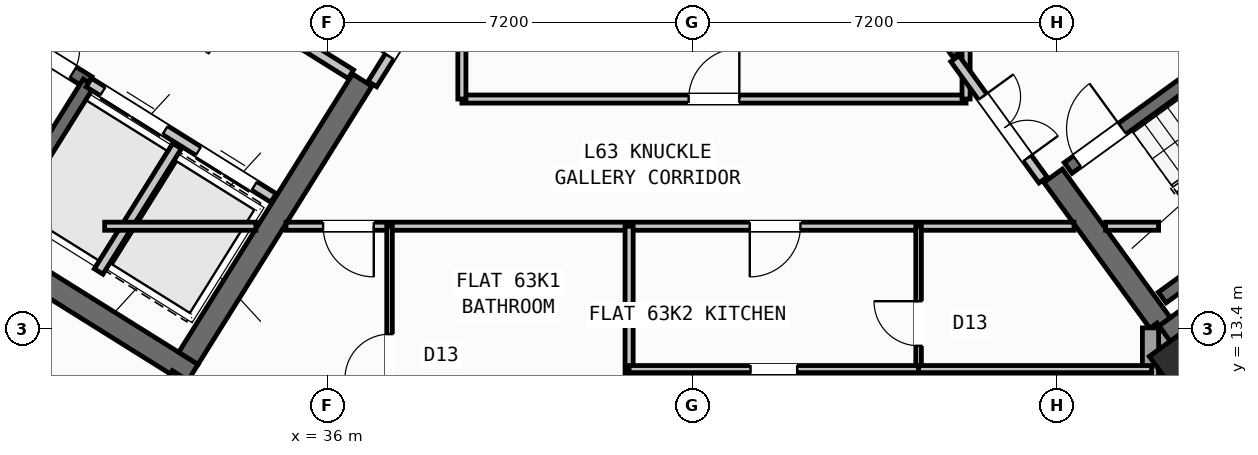
"""IFC4 building model, lengths in metres.
Left out: names, types, materials, properties, quantities, classifications, styles, units other than length and angle.
Written with IfcOpenShell. Run it as: python <this file> out.ifc"""

import sys

from ifc_helpers import new_model, si_unit, direction, frame, frame_2d, origin, origin_2d, place, context, subcontext, project, spatial, rectangle, hollow_rectangle, extrude, source, transform, mapped, element, fill, save


model = new_model("IFC4")
c1 = context("Model", 3, precision=1e-05, world=origin(), true_north=direction((0.0, 1.0)))
c2 = subcontext(c1, "Body", "Model", "MODEL_VIEW")
j1 = project(units=[si_unit("LENGTHUNIT", "METRE"), si_unit("PLANEANGLEUNIT", "RADIAN")], contexts=[c1])
p1 = place(None, origin())
s1 = spatial("IfcSite", under=j1, at=p1, CompositionType="ELEMENT")
p2 = place(p1, origin())
s2 = spatial("IfcBuilding", under=s1, at=p2, CompositionType="ELEMENT")
p3 = place(p2, frame((0.0, 0.0, 251.1)))
s3 = spatial("IfcBuildingStorey", under=s2, at=p3, CompositionType="ELEMENT", Elevation=251.1)
p4 = place(p3, frame((33.324, 12.503, 0.0), z_axis=(0.0, 0.0, 1.0), x_axis=(-0.848043529849, 0.529926571782, 0.0)))
e1 = element("IfcWall", 1, at=p4, inside=s3, PredefinedType="SHEAR", context=c2, shape_type="SweptSolid", body=[
    extrude(rectangle(XDim=13.04, YDim=0.45, at=frame_2d((6.52, 0.0))), origin(), (0.0, 0.0, 1.0), 3.32),
])
p5 = place(p3, frame((36.683, 18.304, 0.0), z_axis=(0.0, 0.0, 1.0), x_axis=(-0.529904039071, -0.848057609704, 0.0)))
e2 = element("IfcWall", 2, at=p5, inside=s3, PredefinedType="SHEAR", context=c2, shape_type="SweptSolid", body=[
    extrude(rectangle(XDim=6.475, YDim=0.45, at=frame_2d((3.238, 0.0))), origin(), (0.0, 0.0, 1.0), 3.32),
])
p6 = place(p3, frame((52.399, 13.169, 0.0), z_axis=(0.0, 0.0, 1.0), x_axis=(0.809022352778, 0.587777877013, 0.0)))
e3 = element("IfcWall", 3, at=p6, inside=s3, PredefinedType="SHEAR", context=c2, shape_type="SweptSolid", body=[
    extrude(rectangle(XDim=12.24, YDim=0.45, at=frame_2d((6.12, 0.0))), origin(), (0.0, 0.0, 1.0), 3.32),
])
p7 = place(p3, frame((52.449, 13.483, 0.0), z_axis=(0.0, 0.0, 1.0), x_axis=(-0.587819244441, 0.808992296542, 0.0)))
e4 = element("IfcWall", 4, at=p7, inside=s3, PredefinedType="SHEAR", context=c2, shape_type="SweptSolid", body=[
    extrude(rectangle(XDim=3.625, YDim=0.45, at=frame_2d((1.812, 0.0))), origin(), (0.0, 0.0, 1.0), 3.32),
])
p8 = place(p3, frame((48.526, 18.884, 0.0), z_axis=(0.0, 0.0, 1.0), x_axis=(-0.587774812919, 0.809024578921, 0.0)))
e5 = element("IfcWall", 5, at=p8, inside=s3, PredefinedType="SHEAR", context=c2, shape_type="SweptSolid", body=[
    extrude(rectangle(XDim=6.475, YDim=0.45, at=frame_2d((3.238, 0.0))), origin(), (0.0, 0.0, 1.0), 3.32),
])
m1 = source(origin(), c2, "Body", "SweptSolid", [
    extrude(hollow_rectangle(XDim=0.7, YDim=0.7, WallThickness=0.028, at=origin_2d()), origin(), (0.0, 0.0, 1.0), 3.6),
])
for number, where, z_axis, x_axis in (
    (6, (33.046, 12.087, 0.0), (0.0, 0.0, 1.0), (-0.848, 0.53, 0.0)),
    (7, (52.705, 12.773, 0.0), (0.0, 0.0, 1.0), (0.809, 0.588, 0.0)),
):
    element("IfcColumn", number, at=place(p3, frame(where, z_axis=z_axis, x_axis=x_axis)), inside=s3, PredefinedType="COLUMN", context=c2, shape_type="MappedRepresentation", body=[
        mapped(m1, transform((0.0, 0.0, 0.0), scale=1.0)),
    ])
p9 = place(p3, frame((56.581, 7.439, 0.0), z_axis=(0.0, 0.0, 1.0), x_axis=(-0.587776558368, 0.809023310809, 0.0)))
e8 = element("IfcWall", 8, at=p9, inside=s3, PredefinedType="STANDARD", context=c2, shape_type="SweptSolid", body=[
    extrude(rectangle(XDim=7.385, YDim=0.32, at=frame_2d((3.693, 0.0))), origin(), (0.0, 0.0, 1.0), 2.845),
])
p10 = place(p3, frame((52.24, 13.414, 0.0), z_axis=(0.0, 0.0, 1.0), x_axis=(0.0, -1.0, 0.0)))
e9 = element("IfcWall", 9, at=p10, inside=s3, PredefinedType="STANDARD", context=c2, shape_type="SweptSolid", body=[
    extrude(rectangle(XDim=9.948, YDim=0.32, at=frame_2d((4.974, 0.0))), origin(), (0.0, 0.0, 1.0), 3.32),
])
p11 = place(p10, frame((3.295, 0.0, 0.9)))
e10 = element("IfcOpeningElement", 10, at=p11, cuts=e9, PredefinedType="OPENING", context=c2, shape_type="SweptSolid", body=[
    extrude(rectangle(XDim=1.65, YDim=1.45, at=frame_2d((0.825, 0.725))), frame((0.0, 0.17, 0.0), z_axis=(0.0, -1.0, 0.0), x_axis=(1.0, 0.0, 0.0)), (0.0, 0.0, 1.0), 0.34),
])
p12 = place(p10, frame((7.408, 0.0, 0.9)))
e11 = element("IfcOpeningElement", 11, at=p12, cuts=e9, PredefinedType="OPENING", context=c2, shape_type="SweptSolid", body=[
    extrude(rectangle(XDim=1.35, YDim=1.45, at=frame_2d((0.675, 0.725))), frame((0.0, 0.17, 0.0), z_axis=(0.0, -1.0, 0.0), x_axis=(1.0, 0.0, 0.0)), (0.0, 0.0, 1.0), 0.34),
])
p13 = place(p3, frame((31.28, 18.261, 0.0), z_axis=(0.0, 0.0, 1.0), x_axis=(-0.848051618787, 0.529913626805, 0.0)))
e12 = element("IfcWall", 12, at=p13, inside=s3, PredefinedType="SHEAR", context=c2, shape_type="SweptSolid", body=[
    extrude(rectangle(XDim=7.46, YDim=0.26, at=frame_2d((3.73, 0.0))), origin(), (0.0, 0.0, 1.0), 3.32),
])
p14 = place(p13, frame((0.36, 0.0, 0.0)))
e13 = element("IfcOpeningElement", 13, at=p14, cuts=e12, PredefinedType="OPENING", context=c2, shape_type="SweptSolid", body=[
    extrude(rectangle(XDim=0.86, YDim=2.05, at=frame_2d((0.43, 1.025))), frame((0.0, 0.14, 0.0), z_axis=(0.0, -1.0, 0.0), x_axis=(1.0, 0.0, 0.0)), (0.0, 0.0, 1.0), 0.28),
])
p15 = place(p3, frame((31.288, 18.256, 0.0), z_axis=(0.0, 0.0, 1.0), x_axis=(-0.529943379326, -0.848033026897, 0.0)))
e14 = element("IfcWall", 14, at=p15, inside=s3, PredefinedType="SHEAR", context=c2, shape_type="SweptSolid", body=[
    extrude(rectangle(XDim=3.16, YDim=0.26, at=frame_2d((1.58, 0.0))), origin(), (0.0, 0.0, 1.0), 3.32),
])
p16 = place(p3, frame((34.933, 15.978, 0.0), z_axis=(0.0, 0.0, 1.0), x_axis=(-0.848055739377, 0.529907032327, 0.0)))
e15 = element("IfcWall", 15, at=p16, inside=s3, PredefinedType="STANDARD", context=c2, shape_type="SweptSolid", body=[
    extrude(rectangle(XDim=4.298, YDim=0.2, at=frame_2d((2.149, 0.0))), origin(), (0.0, 0.0, 1.0), 3.31),
])
p17 = place(p16, frame((0.448, 0.0, 0.0)))
e16 = element("IfcOpeningElement", 16, at=p17, cuts=e15, PredefinedType="OPENING", context=c2, shape_type="SweptSolid", body=[
    extrude(rectangle(XDim=1.3, YDim=2.2, at=frame_2d((0.65, 1.1))), frame((0.0, 0.11, 0.0), z_axis=(0.0, -1.0, 0.0), x_axis=(1.0, 0.0, 0.0)), (0.0, 0.0, 1.0), 0.22),
])
p18 = place(p16, frame((2.523, 0.0, 0.0)))
e17 = element("IfcOpeningElement", 17, at=p18, cuts=e15, PredefinedType="OPENING", context=c2, shape_type="SweptSolid", body=[
    extrude(rectangle(XDim=1.45, YDim=2.25, at=frame_2d((0.725, 1.125))), frame((0.0, 0.11, 0.0), z_axis=(0.0, -1.0, 0.0), x_axis=(1.0, 0.0, 0.0)), (0.0, 0.0, 1.0), 0.22),
])
p19 = place(p3, frame((36.459, 18.421, 0.0), z_axis=(0.0, 0.0, 1.0), x_axis=(-0.848059591691, 0.529900867089, 0.0)))
e18 = element("IfcWall", 18, at=p19, inside=s3, PredefinedType="STANDARD", context=c2, shape_type="SweptSolid", body=[
    extrude(rectangle(XDim=5.818, YDim=0.2, at=frame_2d((2.909, 0.0))), origin(), (0.0, 0.0, 1.0), 3.31),
])
p20 = place(p19, frame((2.598, 0.0, 0.0)))
e19 = element("IfcOpeningElement", 19, at=p20, cuts=e18, PredefinedType="OPENING", context=c2, shape_type="SweptSolid", body=[
    extrude(rectangle(XDim=1.15, YDim=2.1, at=frame_2d((0.575, 1.05))), frame((0.0, 0.11, 0.0), z_axis=(0.0, -1.0, 0.0), x_axis=(1.0, 0.0, 0.0)), (0.0, 0.0, 1.0), 0.22),
])
p21 = place(p3, frame((33.029, 17.003, 0.0), z_axis=(0.0, 0.0, 1.0), x_axis=(-0.529916267533, -0.848049968695, 0.0)))
e20 = element("IfcWall", 20, at=p21, inside=s3, PredefinedType="STANDARD", context=c2, shape_type="SweptSolid", body=[
    extrude(rectangle(XDim=2.92, YDim=0.2, at=frame_2d((1.46, 0.0))), origin(), (0.0, 0.0, 1.0), 3.31),
])
p22 = place(p3, frame((52.472, 14.013, 0.0), z_axis=(0.0, 0.0, 1.0), x_axis=(0.809028366311, 0.587769599847, 0.0)))
e21 = element("IfcWall", 21, at=p22, inside=s3, PredefinedType="SHEAR", context=c2, shape_type="SweptSolid", body=[
    extrude(rectangle(XDim=7.33, YDim=0.26, at=frame_2d((3.665, 0.0))), origin(), (0.0, 0.0, 1.0), 3.32),
])
p23 = place(p3, frame((50.615, 16.57, 0.0), z_axis=(0.0, 0.0, 1.0), x_axis=(0.809028366311, 0.587769599847, 0.0)))
e22 = element("IfcWall", 22, at=p23, inside=s3, PredefinedType="SHEAR", context=c2, shape_type="SweptSolid", body=[
    extrude(rectangle(XDim=7.33, YDim=0.26, at=frame_2d((3.665, 0.0))), origin(), (0.0, 0.0, 1.0), 3.32),
])
p24 = place(p23, frame((0.22, 0.0, 0.0)))
e23 = element("IfcOpeningElement", 23, at=p24, cuts=e22, PredefinedType="OPENING", context=c2, shape_type="SweptSolid", body=[
    extrude(rectangle(XDim=1.1, YDim=2.1, at=frame_2d((0.55, 1.05))), frame((0.0, 0.14, 0.0), z_axis=(0.0, -1.0, 0.0), x_axis=(1.0, 0.0, 0.0)), (0.0, 0.0, 1.0), 0.28),
])
p25 = place(p3, frame((32.164, 10.374, 0.0), z_axis=(0.0, 0.0, 1.0), x_axis=(-0.848044107957, 0.529925646633, 0.0)))
e24 = element("IfcWall", 24, at=p25, inside=s3, PredefinedType="PARTITIONING", context=c2, shape_type="SweptSolid", body=[
    extrude(rectangle(XDim=15.57, YDim=0.16, at=frame_2d((7.785, 0.0))), origin(), (0.0, 0.0, 1.0), 3.31),
])
p26 = place(p25, frame((10.83, 0.0, 0.0)))
e25 = element("IfcOpeningElement", 25, at=p26, cuts=e24, PredefinedType="OPENING", context=c2, shape_type="SweptSolid", body=[
    extrude(rectangle(XDim=1.0, YDim=2.1, at=frame_2d((0.5, 1.05))), frame((0.0, 0.09, 0.0), z_axis=(0.0, -1.0, 0.0), x_axis=(1.0, 0.0, 0.0)), (0.0, 0.0, 1.0), 0.18),
])
p27 = place(p3, frame((38.451, 20.737, 0.0), z_axis=(0.0, 0.0, 1.0), x_axis=(-0.529924799939, -0.848044637038, 0.0)))
e26 = element("IfcWall", 26, at=p27, inside=s3, PredefinedType="STANDARD", context=c2, shape_type="SweptSolid", body=[
    extrude(rectangle(XDim=2.96, YDim=0.2, at=frame_2d((1.48, 0.0))), origin(), (0.0, 0.0, 1.0), 3.31),
])
p28 = place(p27, frame((1.46, 0.0, 0.0)))
e27 = element("IfcOpeningElement", 27, at=p28, cuts=e26, PredefinedType="OPENING", context=c2, shape_type="SweptSolid", body=[
    extrude(rectangle(XDim=0.86, YDim=2.05, at=frame_2d((0.43, 1.025))), frame((0.0, 0.11, 0.0), z_axis=(0.0, -1.0, 0.0), x_axis=(1.0, 0.0, 0.0)), (0.0, 0.0, 1.0), 0.22),
])
p29 = place(p3, frame((31.6, 15.42, 0.0), z_axis=(0.0, 0.0, 1.0), x_axis=(1.0, 0.0, 0.0)))
e28 = element("IfcWall", 28, at=p29, inside=s3, PredefinedType="PARTITIONING", context=c2, shape_type="SweptSolid", body=[
    extrude(rectangle(XDim=2.984, YDim=0.16, at=frame_2d((1.492, 0.0))), origin(), (0.0, 0.0, 1.0), 3.31),
])
p30 = place(p3, frame((35.178, 15.42, 0.0), z_axis=(0.0, 0.0, 1.0), x_axis=(1.0, 0.0, 0.0)))
e29 = element("IfcWall", 29, at=p30, inside=s3, PredefinedType="PARTITIONING", context=c2, shape_type="SweptSolid", body=[
    extrude(rectangle(XDim=15.552, YDim=0.16, at=frame_2d((7.776, 0.0))), origin(), (0.0, 0.0, 1.0), 3.31),
])
p31 = place(p30, frame((0.733, 0.0, 0.0)))
e30 = element("IfcOpeningElement", 30, at=p31, cuts=e29, PredefinedType="OPENING", context=c2, shape_type="SweptSolid", body=[
    extrude(rectangle(XDim=1.0, YDim=2.1, at=frame_2d((0.5, 1.05))), frame((0.0, 0.09, 0.0), z_axis=(0.0, -1.0, 0.0), x_axis=(1.0, 0.0, 0.0)), (0.0, 0.0, 1.0), 0.18),
])
p32 = place(p30, frame((9.153, 0.0, 0.0)))
e31 = element("IfcOpeningElement", 31, at=p32, cuts=e29, PredefinedType="OPENING", context=c2, shape_type="SweptSolid", body=[
    extrude(rectangle(XDim=1.0, YDim=2.1, at=frame_2d((0.5, 1.05))), frame((0.0, 0.09, 0.0), z_axis=(0.0, -1.0, 0.0), x_axis=(1.0, 0.0, 0.0)), (0.0, 0.0, 1.0), 0.18),
])
p33 = place(p3, frame((51.354, 15.42, 0.0), z_axis=(0.0, 0.0, 1.0), x_axis=(1.0, 0.0, 0.0)))
e32 = element("IfcWall", 32, at=p33, inside=s3, PredefinedType="PARTITIONING", context=c2, shape_type="SweptSolid", body=[
    extrude(rectangle(XDim=1.046, YDim=0.16, at=frame_2d((0.523, 0.0))), origin(), (0.0, 0.0, 1.0), 3.31),
])
p34 = place(p3, frame((38.65, 17.93, 0.0), z_axis=(0.0, 0.0, 1.0), x_axis=(1.0, 0.0, 0.0)))
e33 = element("IfcWall", 33, at=p34, inside=s3, PredefinedType="PARTITIONING", context=c2, shape_type="SweptSolid", body=[
    extrude(rectangle(XDim=9.95, YDim=0.16, at=frame_2d((4.975, 0.0))), origin(), (0.0, 0.0, 1.0), 3.31),
])
p35 = place(p34, frame((4.475, 0.0, 0.0)))
e34 = element("IfcOpeningElement", 34, at=p35, cuts=e33, PredefinedType="OPENING", context=c2, shape_type="SweptSolid", body=[
    extrude(rectangle(XDim=1.0, YDim=2.1, at=frame_2d((0.5, 1.05))), frame((0.0, 0.09, 0.0), z_axis=(0.0, -1.0, 0.0), x_axis=(1.0, 0.0, 0.0)), (0.0, 0.0, 1.0), 0.18),
])
p36 = place(p3, frame((38.65, 17.93, 0.0), z_axis=(0.0, 0.0, 1.0), x_axis=(0.0, 1.0, 0.0)))
e35 = element("IfcWall", 35, at=p36, inside=s3, PredefinedType="PARTITIONING", context=c2, shape_type="SweptSolid", body=[
    extrude(rectangle(XDim=3.046, YDim=0.16, at=frame_2d((1.523, 0.0))), origin(), (0.0, 0.0, 1.0), 3.31),
])
p37 = place(p3, frame((48.6, 17.93, 0.0), z_axis=(0.0, 0.0, 1.0), x_axis=(0.0, 1.0, 0.0)))
e36 = element("IfcWall", 36, at=p37, inside=s3, PredefinedType="PARTITIONING", context=c2, shape_type="SweptSolid", body=[
    extrude(rectangle(XDim=0.993, YDim=0.16, at=frame_2d((0.496, 0.0))), origin(), (0.0, 0.0, 1.0), 3.31),
])
p38 = place(p3, frame((50.119, 16.333, 0.0), z_axis=(0.0, 0.0, 1.0), x_axis=(-0.587749856981, 0.809042709391, 0.0)))
e37 = element("IfcWall", 37, at=p38, inside=s3, PredefinedType="STANDARD", context=c2, shape_type="SweptSolid", body=[
    extrude(rectangle(XDim=2.96, YDim=0.2, at=frame_2d((1.48, 0.0))), origin(), (0.0, 0.0, 1.0), 3.31),
])
p39 = place(p38, frame((0.53, 0.0, 0.0)))
e38 = element("IfcOpeningElement", 38, at=p39, cuts=e37, PredefinedType="OPENING", context=c2, shape_type="SweptSolid", body=[
    extrude(rectangle(XDim=1.5, YDim=2.15, at=frame_2d((0.75, 1.075))), frame((0.0, 0.11, 0.0), z_axis=(0.0, -1.0, 0.0), x_axis=(1.0, 0.0, 0.0)), (0.0, 0.0, 1.0), 0.22),
])
p40 = place(p3, frame((41.95, 1.96, 0.0), z_axis=(0.0, 0.0, 1.0), x_axis=(0.0, 1.0, 0.0)))
e39 = element("IfcWall", 39, at=p40, inside=s3, PredefinedType="PARTITIONING", context=c2, shape_type="SweptSolid", body=[
    extrude(rectangle(XDim=13.46, YDim=0.16, at=frame_2d((6.73, 0.0))), origin(), (0.0, 0.0, 1.0), 3.31),
])
p41 = place(p3, frame((37.222, 1.96, 0.0), z_axis=(0.0, 0.0, 1.0), x_axis=(0.0, 1.0, 0.0)))
e40 = element("IfcWall", 40, at=p41, inside=s3, PredefinedType="PARTITIONING", context=c2, shape_type="SweptSolid", body=[
    extrude(rectangle(XDim=13.46, YDim=0.11, at=frame_2d((6.73, 0.0))), origin(), (0.0, 0.0, 1.0), 3.31),
])
p42 = place(p41, frame((5.2, 0.0, 0.0)))
e41 = element("IfcOpeningElement", 41, at=p42, cuts=e40, PredefinedType="OPENING", context=c2, shape_type="SweptSolid", body=[
    extrude(rectangle(XDim=0.92, YDim=2.08, at=frame_2d((0.46, 1.04))), frame((0.0, 0.065, 0.0), z_axis=(0.0, -1.0, 0.0), x_axis=(1.0, 0.0, 0.0)), (0.0, 0.0, 1.0), 0.13),
])
p43 = place(p41, frame((10.45, 0.0, 0.0)))
e42 = element("IfcOpeningElement", 42, at=p43, cuts=e40, PredefinedType="OPENING", context=c2, shape_type="SweptSolid", body=[
    extrude(rectangle(XDim=0.88, YDim=2.08, at=frame_2d((0.44, 1.04))), frame((0.0, 0.065, 0.0), z_axis=(0.0, -1.0, 0.0), x_axis=(1.0, 0.0, 0.0)), (0.0, 0.0, 1.0), 0.13),
])
p44 = place(p3, frame((47.663, 1.96, 0.0), z_axis=(0.0, 0.0, 1.0), x_axis=(0.0, 1.0, 0.0)))
e43 = element("IfcWall", 43, at=p44, inside=s3, PredefinedType="PARTITIONING", context=c2, shape_type="SweptSolid", body=[
    extrude(rectangle(XDim=13.46, YDim=0.11, at=frame_2d((6.73, 0.0))), origin(), (0.0, 0.0, 1.0), 3.31),
])
p45 = place(p44, frame((6.3, 0.0, 0.0)))
e44 = element("IfcOpeningElement", 44, at=p45, cuts=e43, PredefinedType="OPENING", context=c2, shape_type="SweptSolid", body=[
    extrude(rectangle(XDim=0.92, YDim=2.08, at=frame_2d((0.46, 1.04))), frame((0.0, 0.065, 0.0), z_axis=(0.0, -1.0, 0.0), x_axis=(1.0, 0.0, 0.0)), (0.0, 0.0, 1.0), 0.13),
])
p46 = place(p44, frame((11.1, 0.0, 0.0)))
e45 = element("IfcOpeningElement", 45, at=p46, cuts=e43, PredefinedType="OPENING", context=c2, shape_type="SweptSolid", body=[
    extrude(rectangle(XDim=0.88, YDim=2.08, at=frame_2d((0.44, 1.04))), frame((0.0, 0.065, 0.0), z_axis=(0.0, -1.0, 0.0), x_axis=(1.0, 0.0, 0.0)), (0.0, 0.0, 1.0), 0.13),
])
p47 = place(p3, frame((41.95, 12.6, 0.0), z_axis=(0.0, 0.0, 1.0), x_axis=(1.0, 0.0, 0.0)))
e46 = element("IfcWall", 46, at=p47, inside=s3, PredefinedType="PLUMBINGWALL", context=c2, shape_type="SweptSolid", body=[
    extrude(rectangle(XDim=5.713, YDim=0.14, at=frame_2d((2.856, 0.0))), origin(), (0.0, 0.0, 1.0), 2.495),
])
p48 = place(p47, frame((2.396, 0.0, 0.0)))
e47 = element("IfcOpeningElement", 47, at=p48, cuts=e46, PredefinedType="OPENING", context=c2, shape_type="SweptSolid", body=[
    extrude(rectangle(XDim=0.92, YDim=2.08, at=frame_2d((0.46, 1.04))), frame((0.0, 0.08, 0.0), z_axis=(0.0, -1.0, 0.0), x_axis=(1.0, 0.0, 0.0)), (0.0, 0.0, 1.0), 0.16),
])
p49 = place(p3, frame((47.663, 12.6, 0.0), z_axis=(0.0, 0.0, 1.0), x_axis=(1.0, 0.0, 0.0)))
e48 = element("IfcWall", 48, at=p49, inside=s3, PredefinedType="PLUMBINGWALL", context=c2, shape_type="SweptSolid", body=[
    extrude(rectangle(XDim=4.597, YDim=0.14, at=frame_2d((2.298, 0.0))), origin(), (0.0, 0.0, 1.0), 2.495),
])
m2 = source(origin(), c2, "Body", "SweptSolid", [
    extrude(rectangle(XDim=0.86, YDim=2.05, at=frame_2d((0.43, 1.025))), frame((0.0, 0.025, 0.0), z_axis=(0.0, -1.0, 0.0), x_axis=(1.0, 0.0, 0.0)), (0.0, 0.0, 1.0), 0.05),
])
p50 = place(p14, frame((0.86, 0.0, 0.0), z_axis=(0.0, 0.0, 1.0), x_axis=(-1.0, 0.0, 0.0)))
e49 = element("IfcDoor", 49, at=p50, inside=s3, OperationType="SINGLE_SWING_LEFT", PredefinedType="DOOR", context=c2, shape_type="MappedRepresentation", body=[
    mapped(m2, transform((0.0, 0.0, 0.0), scale=1.0)),
])
fill(e13, e49)
m3 = source(origin(), c2, "Body", "SweptSolid", [
    extrude(rectangle(XDim=1.3, YDim=2.2, at=frame_2d((0.65, 1.1))), frame((0.0, 0.025, 0.0), z_axis=(0.0, -1.0, 0.0), x_axis=(1.0, 0.0, 0.0)), (0.0, 0.0, 1.0), 0.05),
])
p51 = place(p17, origin())
e50 = element("IfcDoor", 50, at=p51, inside=s3, OperationType="DOUBLE_DOOR_SLIDING", PredefinedType="DOOR", context=c2, shape_type="MappedRepresentation", body=[
    mapped(m3, transform((0.0, 0.0, 0.0), scale=1.0)),
])
fill(e16, e50)
m4 = source(origin(), c2, "Body", "SweptSolid", [
    extrude(rectangle(XDim=1.45, YDim=2.25, at=frame_2d((0.725, 1.125))), frame((0.0, 0.025, 0.0), z_axis=(0.0, -1.0, 0.0), x_axis=(1.0, 0.0, 0.0)), (0.0, 0.0, 1.0), 0.05),
])
p52 = place(p18, origin())
e51 = element("IfcDoor", 51, at=p52, inside=s3, OperationType="DOUBLE_DOOR_SLIDING", PredefinedType="DOOR", context=c2, shape_type="MappedRepresentation", body=[
    mapped(m4, transform((0.0, 0.0, 0.0), scale=1.0)),
])
fill(e17, e51)
m5 = source(origin(), c2, "Body", "SweptSolid", [
    extrude(rectangle(XDim=1.1, YDim=2.1, at=frame_2d((0.55, 1.05))), frame((0.0, 0.025, 0.0), z_axis=(0.0, -1.0, 0.0), x_axis=(1.0, 0.0, 0.0)), (0.0, 0.0, 1.0), 0.05),
])
p53 = place(p24, origin())
e52 = element("IfcDoor", 52, at=p53, inside=s3, OperationType="SINGLE_SWING_RIGHT", PredefinedType="DOOR", context=c2, shape_type="MappedRepresentation", body=[
    mapped(m5, transform((0.0, 0.0, 0.0), scale=1.0)),
])
fill(e23, e52)
m6 = source(origin(), c2, "Body", "SweptSolid", [
    extrude(rectangle(XDim=1.0, YDim=2.1, at=frame_2d((0.5, 1.05))), frame((0.0, 0.025, 0.0), z_axis=(0.0, -1.0, 0.0), x_axis=(1.0, 0.0, 0.0)), (0.0, 0.0, 1.0), 0.05),
])
p54 = place(p35, origin())
e53 = element("IfcDoor", 53, at=p54, inside=s3, OperationType="SINGLE_SWING_RIGHT", PredefinedType="DOOR", context=c2, shape_type="MappedRepresentation", body=[
    mapped(m6, transform((0.0, 0.0, 0.0), scale=1.0)),
])
fill(e34, e53)
p55 = place(p28, frame((0.86, 0.0, 0.0), z_axis=(0.0, 0.0, 1.0), x_axis=(-1.0, 0.0, 0.0)))
e54 = element("IfcDoor", 54, at=p55, inside=s3, OperationType="SINGLE_SWING_LEFT", PredefinedType="DOOR", context=c2, shape_type="MappedRepresentation", body=[
    mapped(m2, transform((0.0, 0.0, 0.0), scale=1.0)),
])
fill(e27, e54)
m7 = source(origin(), c2, "Body", "SweptSolid", [
    extrude(rectangle(XDim=1.5, YDim=2.15, at=frame_2d((0.75, 1.075))), frame((0.0, 0.025, 0.0), z_axis=(0.0, -1.0, 0.0), x_axis=(1.0, 0.0, 0.0)), (0.0, 0.0, 1.0), 0.05),
])
p56 = place(p39, frame((1.5, 0.0, 0.0), z_axis=(0.0, 0.0, 1.0), x_axis=(-1.0, 0.0, 0.0)))
e55 = element("IfcDoor", 55, at=p56, inside=s3, OperationType="DOUBLE_DOOR_SINGLE_SWING", PredefinedType="DOOR", context=c2, shape_type="MappedRepresentation", body=[
    mapped(m7, transform((0.0, 0.0, 0.0), scale=1.0)),
])
fill(e38, e55)
p57 = place(p31, frame((1.0, 0.0, 0.0), z_axis=(0.0, 0.0, 1.0), x_axis=(-1.0, 0.0, 0.0)))
e56 = element("IfcDoor", 56, at=p57, inside=s3, OperationType="SINGLE_SWING_LEFT", PredefinedType="DOOR", context=c2, shape_type="MappedRepresentation", body=[
    mapped(m6, transform((0.0, 0.0, 0.0), scale=1.0)),
])
fill(e30, e56)
m8 = source(origin(), c2, "Body", "SweptSolid", [
    extrude(rectangle(XDim=0.88, YDim=2.08, at=frame_2d((0.44, 1.04))), frame((0.0, 0.025, 0.0), z_axis=(0.0, -1.0, 0.0), x_axis=(1.0, 0.0, 0.0)), (0.0, 0.0, 1.0), 0.05),
])
p58 = place(p43, origin())
e57 = element("IfcDoor", 57, at=p58, inside=s3, OperationType="SINGLE_SWING_LEFT", PredefinedType="DOOR", context=c2, shape_type="MappedRepresentation", body=[
    mapped(m8, transform((0.0, 0.0, 0.0), scale=1.0)),
])
fill(e42, e57)
p59 = place(p32, frame((1.0, 0.0, 0.0), z_axis=(0.0, 0.0, 1.0), x_axis=(-1.0, 0.0, 0.0)))
e58 = element("IfcDoor", 58, at=p59, inside=s3, OperationType="SINGLE_SWING_RIGHT", PredefinedType="DOOR", context=c2, shape_type="MappedRepresentation", body=[
    mapped(m6, transform((0.0, 0.0, 0.0), scale=1.0)),
])
fill(e31, e58)
m9 = source(origin(), c2, "Body", "SweptSolid", [
    extrude(rectangle(XDim=0.92, YDim=2.08, at=frame_2d((0.46, 1.04))), frame((0.0, 0.025, 0.0), z_axis=(0.0, -1.0, 0.0), x_axis=(1.0, 0.0, 0.0)), (0.0, 0.0, 1.0), 0.05),
])
p60 = place(p48, frame((0.92, 0.0, 0.0), z_axis=(0.0, 0.0, 1.0), x_axis=(-1.0, 0.0, 0.0)))
e59 = element("IfcDoor", 59, at=p60, inside=s3, OperationType="SINGLE_SWING_LEFT", PredefinedType="DOOR", context=c2, shape_type="MappedRepresentation", body=[
    mapped(m9, transform((0.0, 0.0, 0.0), scale=1.0)),
])
fill(e47, e59)
p61 = place(p46, origin())
e60 = element("IfcDoor", 60, at=p61, inside=s3, OperationType="SINGLE_SWING_RIGHT", PredefinedType="DOOR", context=c2, shape_type="MappedRepresentation", body=[
    mapped(m8, transform((0.0, 0.0, 0.0), scale=1.0)),
])
fill(e45, e60)
save(model, sys.argv[1])
